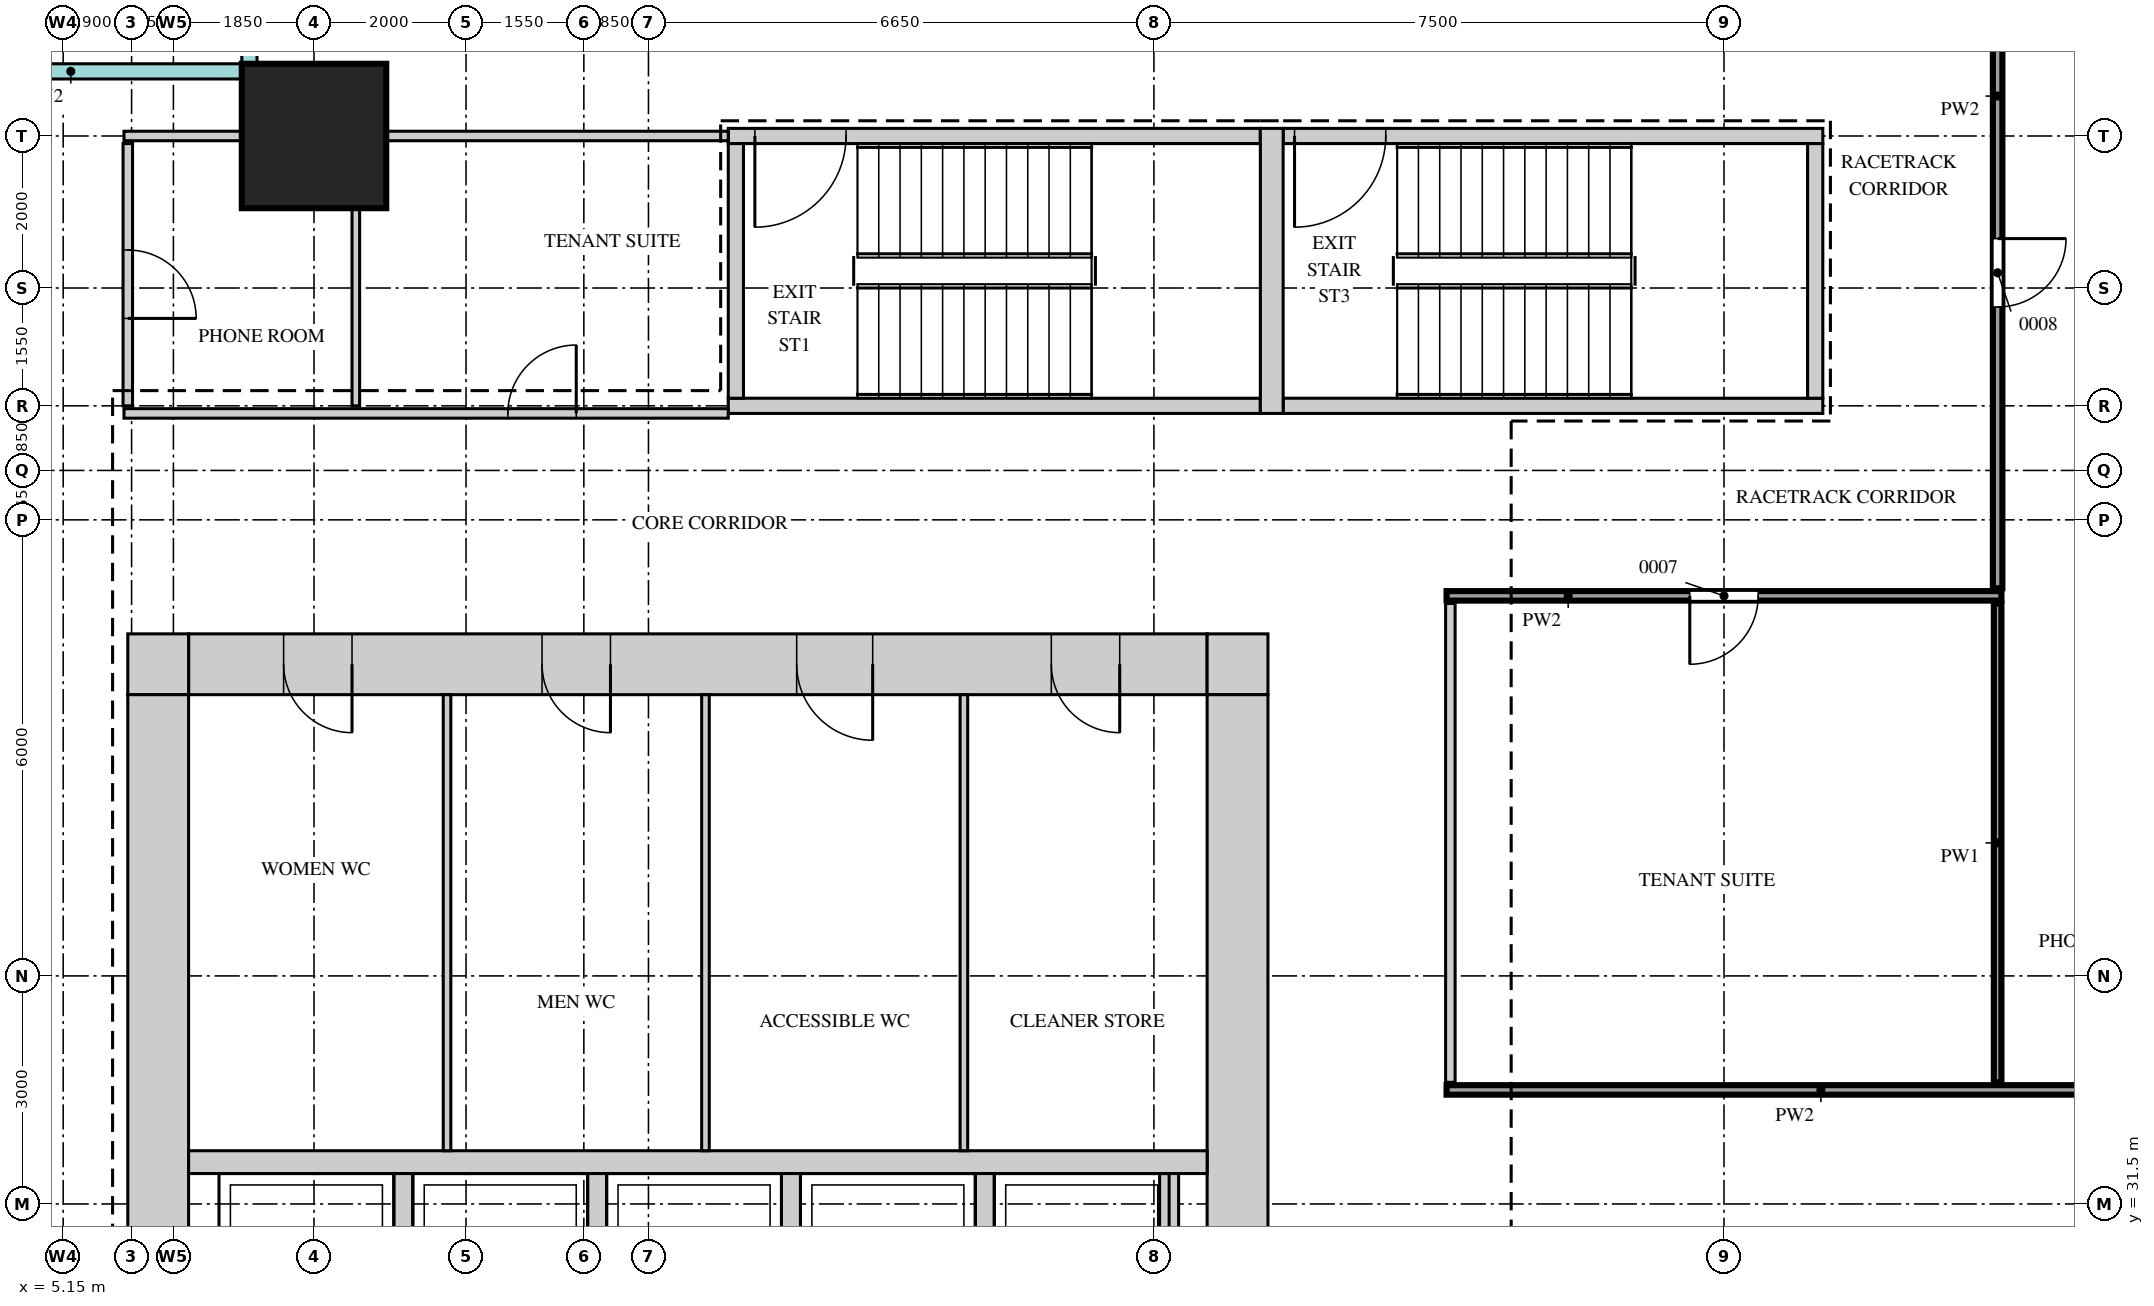
"""IFC4 building model, lengths in metres.
Left out: names, types, materials, properties, quantities, classifications, styles, units other than length and angle.
Written with IfcOpenShell. Run it as: python <this file> out.ifc"""

import sys

from ifc_helpers import new_model, si_unit, direction, frame, frame_2d, origin, origin_2d, place, context, subcontext, project, spatial, rectangle, extrude, source, transform, mapped, element, fill, save


model = new_model("IFC4")
c1 = context("Model", 3, precision=1e-05, world=origin(), true_north=direction((0.0, 1.0)))
c2 = subcontext(c1, "Body", "Model", "MODEL_VIEW")
j1 = project(units=[si_unit("LENGTHUNIT", "METRE"), si_unit("PLANEANGLEUNIT", "RADIAN")], contexts=[c1])
p1 = place(None, origin())
s1 = spatial("IfcSite", under=j1, at=p1, CompositionType="ELEMENT")
p2 = place(p1, origin())
s2 = spatial("IfcBuilding", under=s1, at=p2, CompositionType="ELEMENT")
p3 = place(p2, frame((0.0, 0.0, 180.7)))
s3 = spatial("IfcBuildingStorey", under=s2, at=p3, CompositionType="ELEMENT", Elevation=180.7)
m1 = source(origin(), c2, "Body", "SweptSolid", [
    extrude(rectangle(XDim=13.4, YDim=0.8, at=frame_2d((6.7, 0.0))), origin(), (0.0, 0.0, 1.0), 3.75),
])
p4 = place(p3, frame((6.8, 38.6, 0.0), z_axis=(0.0, 0.0, 1.0), x_axis=(1.0, 0.0, 0.0)))
e1 = element("IfcWall", 1, at=p4, inside=s3, PredefinedType="SHEAR", context=c2, shape_type="MappedRepresentation", body=[
    mapped(m1, transform((0.0, 0.0, 0.0))),
])
m2 = source(origin(), c2, "Body", "SweptSolid", [
    extrude(rectangle(XDim=0.9, YDim=2.1, at=frame_2d((0.45, 1.05))), frame((0.0, 0.41, 0.0), z_axis=(0.0, -1.0, 0.0), x_axis=(1.0, 0.0, 0.0)), (0.0, 0.0, 1.0), 0.82),
])
p5 = place(p4, frame((1.25, 0.0, 0.0)))
e2 = element("IfcOpeningElement", 2, at=p5, cuts=e1, PredefinedType="OPENING", context=c2, shape_type="MappedRepresentation", body=[
    mapped(m2, transform((0.0, 0.0, 0.0))),
])
p6 = place(p4, frame((4.65, 0.0, 0.0)))
e3 = element("IfcOpeningElement", 3, at=p6, cuts=e1, PredefinedType="OPENING", context=c2, shape_type="MappedRepresentation", body=[
    mapped(m2, transform((0.0, 0.0, 0.0))),
])
m3 = source(origin(), c2, "Body", "SweptSolid", [
    extrude(rectangle(XDim=1.0, YDim=2.1, at=frame_2d((0.5, 1.05))), frame((0.0, 0.41, 0.0), z_axis=(0.0, -1.0, 0.0), x_axis=(1.0, 0.0, 0.0)), (0.0, 0.0, 1.0), 0.82),
])
p7 = place(p4, frame((8.0, 0.0, 0.0)))
e4 = element("IfcOpeningElement", 4, at=p7, cuts=e1, PredefinedType="OPENING", context=c2, shape_type="MappedRepresentation", body=[
    mapped(m3, transform((0.0, 0.0, 0.0))),
])
p8 = place(p4, frame((11.35, 0.0, 0.0)))
e5 = element("IfcOpeningElement", 5, at=p8, cuts=e1, PredefinedType="OPENING", context=c2, shape_type="MappedRepresentation", body=[
    mapped(m2, transform((0.0, 0.0, 0.0))),
])
m4 = source(origin(), c2, "Body", "SweptSolid", [
    extrude(rectangle(XDim=0.8, YDim=0.8, at=frame_2d((0.4, 0.0))), origin(), (0.0, 0.0, 1.0), 3.75),
])
for number, where, z_axis, x_axis in (
    (6, (20.2, 38.6, 0.0), (0.0, 0.0, 1.0), (1.0, 0.0, 0.0)),
    (7, (6.0, 38.6, 0.0), (0.0, 0.0, 1.0), (1.0, 0.0, 0.0)),
):
    element("IfcWall", number, at=place(p3, frame(where, z_axis=z_axis, x_axis=x_axis)), inside=s3, PredefinedType="SHEAR", context=c2, shape_type="MappedRepresentation", body=[
        mapped(m4, transform((0.0, 0.0, 0.0))),
    ])
m5 = source(origin(), c2, "Body", "SweptSolid", [
    extrude(rectangle(XDim=22.4, YDim=0.8, at=frame_2d((11.2, 0.0))), origin(), (0.0, 0.0, 1.0), 3.75),
])
p9 = place(p3, frame((20.6, 15.8, 0.0), z_axis=(0.0, 0.0, 1.0), x_axis=(0.0, 1.0, 0.0)))
e8 = element("IfcWall", 8, at=p9, inside=s3, PredefinedType="SHEAR", context=c2, shape_type="MappedRepresentation", body=[
    mapped(m5, transform((0.0, 0.0, 0.0))),
])
m6 = source(origin(), c2, "Body", "SweptSolid", [
    extrude(rectangle(XDim=1.8, YDim=2.1, at=frame_2d((0.9, 1.05))), frame((0.0, 0.41, 0.0), z_axis=(0.0, -1.0, 0.0), x_axis=(1.0, 0.0, 0.0)), (0.0, 0.0, 1.0), 0.82),
])
p10 = place(p9, frame((10.7, 0.0, 0.0)))
e9 = element("IfcOpeningElement", 9, at=p10, cuts=e8, PredefinedType="OPENING", context=c2, shape_type="MappedRepresentation", body=[
    mapped(m6, transform((0.0, 0.0, 0.0))),
])
p11 = place(p9, frame((0.35, 0.0, 0.0)))
e10 = element("IfcOpeningElement", 10, at=p11, cuts=e8, PredefinedType="OPENING", context=c2, shape_type="MappedRepresentation", body=[
    mapped(m2, transform((0.0, 0.0, 0.0))),
])
p12 = place(p9, frame((3.9, 0.0, 0.0)))
e11 = element("IfcOpeningElement", 11, at=p12, cuts=e8, PredefinedType="OPENING", context=c2, shape_type="MappedRepresentation", body=[
    mapped(m2, transform((0.0, 0.0, 0.0))),
])
p13 = place(p3, frame((6.4, 15.8, 0.0), z_axis=(0.0, 0.0, 1.0), x_axis=(0.0, 1.0, 0.0)))
e12 = element("IfcWall", 12, at=p13, inside=s3, PredefinedType="SHEAR", context=c2, shape_type="MappedRepresentation", body=[
    mapped(m5, transform((0.0, 0.0, 0.0))),
])
m7 = source(origin(), c2, "Body", "SweptSolid", [
    extrude(rectangle(XDim=7.0, YDim=0.2, at=frame_2d((3.5, 0.0))), origin(), (0.0, 0.0, 1.0), 3.75),
])
p14 = place(p3, frame((13.9, 45.55, 0.0), z_axis=(0.0, 0.0, 1.0), x_axis=(1.0, 0.0, 0.0)))
e13 = element("IfcWall", 13, at=p14, inside=s3, PredefinedType="SHEAR", context=c2, shape_type="MappedRepresentation", body=[
    mapped(m7, transform((0.0, 0.0, 0.0))),
])
m8 = source(origin(), c2, "Body", "SweptSolid", [
    extrude(rectangle(XDim=1.2, YDim=2.1, at=frame_2d((0.6, 1.05))), frame((0.0, 0.11, 0.0), z_axis=(0.0, -1.0, 0.0), x_axis=(1.0, 0.0, 0.0)), (0.0, 0.0, 1.0), 0.22),
])
p15 = place(p14, frame((0.35, 0.0, 0.0)))
e14 = element("IfcOpeningElement", 14, at=p15, cuts=e13, PredefinedType="OPENING", context=c2, shape_type="MappedRepresentation", body=[
    mapped(m8, transform((0.0, 0.0, 0.0))),
])
p16 = place(p3, frame((13.9, 42.0, 0.0), z_axis=(0.0, 0.0, 1.0), x_axis=(1.0, 0.0, 0.0)))
e15 = element("IfcWall", 15, at=p16, inside=s3, PredefinedType="SHEAR", context=c2, shape_type="MappedRepresentation", body=[
    mapped(m7, transform((0.0, 0.0, 0.0))),
])
m9 = source(origin(), c2, "Body", "SweptSolid", [
    extrude(rectangle(XDim=7.1, YDim=0.2, at=frame_2d((3.55, 0.0))), origin(), (0.0, 0.0, 1.0), 3.75),
])
p17 = place(p3, frame((21.2, 45.55, 0.0), z_axis=(0.0, 0.0, 1.0), x_axis=(1.0, 0.0, 0.0)))
e16 = element("IfcWall", 16, at=p17, inside=s3, PredefinedType="SHEAR", context=c2, shape_type="MappedRepresentation", body=[
    mapped(m9, transform((0.0, 0.0, 0.0))),
])
p18 = place(p17, frame((0.15, 0.0, 0.0)))
e17 = element("IfcOpeningElement", 17, at=p18, cuts=e16, PredefinedType="OPENING", context=c2, shape_type="MappedRepresentation", body=[
    mapped(m8, transform((0.0, 0.0, 0.0))),
])
p19 = place(p3, frame((21.2, 42.0, 0.0), z_axis=(0.0, 0.0, 1.0), x_axis=(1.0, 0.0, 0.0)))
e18 = element("IfcWall", 18, at=p19, inside=s3, PredefinedType="SHEAR", context=c2, shape_type="MappedRepresentation", body=[
    mapped(m9, transform((0.0, 0.0, 0.0))),
])
m10 = source(origin(), c2, "Body", "SweptSolid", [
    extrude(rectangle(XDim=3.75, YDim=0.3, at=frame_2d((1.875, 0.0))), origin(), (0.0, 0.0, 1.0), 3.75),
])
p20 = place(p3, frame((21.05, 41.9, 0.0), z_axis=(0.0, 0.0, 1.0), x_axis=(0.0, 1.0, 0.0)))
e19 = element("IfcWall", 19, at=p20, inside=s3, PredefinedType="SHEAR", context=c2, shape_type="MappedRepresentation", body=[
    mapped(m10, transform((0.0, 0.0, 0.0))),
])
m11 = source(origin(), c2, "Body", "SweptSolid", [
    extrude(rectangle(XDim=3.35, YDim=0.2, at=frame_2d((1.675, 0.0))), origin(), (0.0, 0.0, 1.0), 3.75),
])
for number, where, z_axis, x_axis in (
    (20, (14.0, 42.1, 0.0), (0.0, 0.0, 1.0), (0.0, 1.0, 0.0)),
    (21, (28.2, 42.1, 0.0), (0.0, 0.0, 1.0), (0.0, 1.0, 0.0)),
):
    element("IfcWall", number, at=place(p3, frame(where, z_axis=z_axis, x_axis=x_axis)), inside=s3, PredefinedType="SHEAR", context=c2, shape_type="MappedRepresentation", body=[
        mapped(m11, transform((0.0, 0.0, 0.0))),
    ])
m12 = source(origin(), c2, "Body", "SweptSolid", [
    extrude(rectangle(XDim=13.4, YDim=0.3, at=frame_2d((6.7, 0.0))), origin(), (0.0, 0.0, 1.0), 3.75),
])
p21 = place(p3, frame((6.8, 32.05, 0.0), z_axis=(0.0, 0.0, 1.0), x_axis=(1.0, 0.0, 0.0)))
e22 = element("IfcWall", 22, at=p21, inside=s3, PredefinedType="STANDARD", context=c2, shape_type="MappedRepresentation", body=[
    mapped(m12, transform((0.0, 0.0, 0.0))),
])
m13 = source(origin(), c2, "Body", "SweptSolid", [
    extrude(rectangle(XDim=2.4, YDim=0.25, at=frame_2d((1.2, 0.0))), origin(), (0.0, 0.0, 1.0), 3.75),
])
for number, where, z_axis, x_axis in (
    (23, (17.275, 29.5, 0.0), (0.0, 0.0, 1.0), (0.0, 1.0, 0.0)),
    (24, (19.7, 29.5, 0.0), (0.0, 0.0, 1.0), (0.0, 1.0, 0.0)),
    (25, (9.625, 29.5, 0.0), (0.0, 0.0, 1.0), (0.0, 1.0, 0.0)),
    (26, (12.175, 29.5, 0.0), (0.0, 0.0, 1.0), (0.0, 1.0, 0.0)),
    (27, (14.725, 29.5, 0.0), (0.0, 0.0, 1.0), (0.0, 1.0, 0.0)),
):
    element("IfcWall", number, at=place(p3, frame(where, z_axis=z_axis, x_axis=x_axis)), inside=s3, PredefinedType="STANDARD", context=c2, shape_type="MappedRepresentation", body=[
        mapped(m13, transform((0.0, 0.0, 0.0))),
    ])
m14 = source(origin(), c2, "Body", "SweptSolid", [
    extrude(rectangle(XDim=1.9, YDim=1.9, at=origin_2d()), origin(), (0.0, 0.0, 1.0), 4.0),
])
p22 = place(p3, frame((8.45, 45.55, 0.0), z_axis=(0.0, 0.0, 1.0), x_axis=(1.0, 0.0, 0.0)))
e28 = element("IfcColumn", 28, at=p22, inside=s3, PredefinedType="COLUMN", context=c2, shape_type="MappedRepresentation", body=[
    mapped(m14, transform((0.0, 0.0, 0.0))),
])
m15 = source(origin(), c2, "Body", "SweptSolid", [
    extrude(rectangle(XDim=6.0, YDim=0.1, at=frame_2d((3.0, 0.0))), origin(), (0.0, 0.0, 1.0), 3.8),
])
for number, where, z_axis, x_axis in (
    (29, (10.2, 32.2, 0.0), (0.0, 0.0, 1.0), (0.0, 1.0, 0.0)),
    (30, (13.6, 32.2, 0.0), (0.0, 0.0, 1.0), (0.0, 1.0, 0.0)),
    (31, (17.0, 32.2, 0.0), (0.0, 0.0, 1.0), (0.0, 1.0, 0.0)),
):
    element("IfcWall", number, at=place(p3, frame(where, z_axis=z_axis, x_axis=x_axis)), inside=s3, PredefinedType="PARTITIONING", context=c2, shape_type="MappedRepresentation", body=[
        mapped(m15, transform((0.0, 0.0, 0.0))),
    ])
m16 = source(origin(), c2, "Body", "SweptSolid", [
    extrude(rectangle(XDim=9.85, YDim=0.125, at=frame_2d((4.925, 0.0))), origin(), (0.0, 0.0, 1.0), 3.8),
])
p23 = place(p3, frame((23.35, 33.0, 0.0), z_axis=(0.0, 0.0, 1.0), x_axis=(1.0, 0.0, 0.0)))
e32 = element("IfcWall", 32, at=p23, inside=s3, PredefinedType="PARTITIONING", context=c2, shape_type="MappedRepresentation", body=[
    mapped(m16, transform((0.0, 0.0, 0.0))),
])
m17 = source(origin(), c2, "Body", "SweptSolid", [
    extrude(rectangle(XDim=6.3, YDim=0.125, at=frame_2d((3.15, 0.0))), origin(), (0.0, 0.0, 1.0), 3.8),
])
p24 = place(p3, frame((23.4, 33.1, 0.0), z_axis=(0.0, 0.0, 1.0), x_axis=(0.0, 1.0, 0.0)))
e33 = element("IfcWall", 33, at=p24, inside=s3, PredefinedType="PARTITIONING", context=c2, shape_type="MappedRepresentation", body=[
    mapped(m17, transform((0.0, 0.0, 0.0))),
])
m18 = source(origin(), c2, "Body", "SweptSolid", [
    extrude(rectangle(XDim=6.3, YDim=0.1, at=frame_2d((3.15, 0.0))), origin(), (0.0, 0.0, 1.0), 3.8),
])
p25 = place(p3, frame((30.6, 33.1, 0.0), z_axis=(0.0, 0.0, 1.0), x_axis=(0.0, 1.0, 0.0)))
e34 = element("IfcWall", 34, at=p25, inside=s3, PredefinedType="PARTITIONING", context=c2, shape_type="MappedRepresentation", body=[
    mapped(m18, transform((0.0, 0.0, 0.0))),
])
m19 = source(origin(), c2, "Body", "SweptSolid", [
    extrude(rectangle(XDim=7.3, YDim=0.125, at=frame_2d((3.65, 0.0))), origin(), (0.0, 0.0, 1.0), 3.8),
])
p26 = place(p3, frame((23.35, 39.5, 0.0), z_axis=(0.0, 0.0, 1.0), x_axis=(1.0, 0.0, 0.0)))
e35 = element("IfcWall", 35, at=p26, inside=s3, PredefinedType="PARTITIONING", context=c2, shape_type="MappedRepresentation", body=[
    mapped(m19, transform((0.0, 0.0, 0.0))),
])
m20 = source(origin(), c2, "Body", "SweptSolid", [
    extrude(rectangle(XDim=0.9, YDim=2.1, at=frame_2d((0.45, 1.05))), frame((0.0, 0.073, 0.0), z_axis=(0.0, -1.0, 0.0), x_axis=(1.0, 0.0, 0.0)), (0.0, 0.0, 1.0), 0.145),
])
p27 = place(p26, frame((3.2, 0.0, 0.0)))
e36 = element("IfcOpeningElement", 36, at=p27, cuts=e35, PredefinedType="OPENING", context=c2, shape_type="MappedRepresentation", body=[
    mapped(m20, transform((0.0, 0.0, 0.0))),
])
m21 = source(origin(), c2, "Body", "SweptSolid", [
    extrude(rectangle(XDim=8.35, YDim=0.125, at=frame_2d((4.175, 0.0))), origin(), (0.0, 0.0, 1.0), 3.8),
])
p28 = place(p3, frame((30.6, 39.6, 0.0), z_axis=(0.0, 0.0, 1.0), x_axis=(0.0, 1.0, 0.0)))
e37 = element("IfcWall", 37, at=p28, inside=s3, PredefinedType="PARTITIONING", context=c2, shape_type="MappedRepresentation", body=[
    mapped(m21, transform((0.0, 0.0, 0.0))),
])
p29 = place(p28, frame((3.7, 0.0, 0.0)))
e38 = element("IfcOpeningElement", 38, at=p29, cuts=e37, PredefinedType="OPENING", context=c2, shape_type="MappedRepresentation", body=[
    mapped(m20, transform((0.0, 0.0, 0.0))),
])
m22 = source(origin(), c2, "Body", "SweptSolid", [
    extrude(rectangle(XDim=7.95, YDim=0.125, at=frame_2d((3.975, 0.0))), origin(), (0.0, 0.0, 1.0), 3.8),
])
p30 = place(p3, frame((5.95, 41.9, 0.0), z_axis=(0.0, 0.0, 1.0), x_axis=(1.0, 0.0, 0.0)))
e39 = element("IfcWall", 39, at=p30, inside=s3, PredefinedType="PARTITIONING", context=c2, shape_type="MappedRepresentation", body=[
    mapped(m22, transform((0.0, 0.0, 0.0))),
])
p31 = place(p30, frame((5.05, 0.0, 0.0)))
e40 = element("IfcOpeningElement", 40, at=p31, cuts=e39, PredefinedType="OPENING", context=c2, shape_type="MappedRepresentation", body=[
    mapped(m20, transform((0.0, 0.0, 0.0))),
])
m23 = source(origin(), c2, "Body", "SweptSolid", [
    extrude(rectangle(XDim=3.45, YDim=0.125, at=frame_2d((1.725, 0.0))), origin(), (0.0, 0.0, 1.0), 3.8),
])
p32 = place(p3, frame((6.0, 42.0, 0.0), z_axis=(0.0, 0.0, 1.0), x_axis=(0.0, 1.0, 0.0)))
e41 = element("IfcWall", 41, at=p32, inside=s3, PredefinedType="PARTITIONING", context=c2, shape_type="MappedRepresentation", body=[
    mapped(m23, transform((0.0, 0.0, 0.0))),
])
p33 = place(p32, frame((1.15, 0.0, 0.0)))
e42 = element("IfcOpeningElement", 42, at=p33, cuts=e41, PredefinedType="OPENING", context=c2, shape_type="MappedRepresentation", body=[
    mapped(m20, transform((0.0, 0.0, 0.0))),
])
m24 = source(origin(), c2, "Body", "SweptSolid", [
    extrude(rectangle(XDim=3.45, YDim=0.1, at=frame_2d((1.725, 0.0))), origin(), (0.0, 0.0, 1.0), 3.8),
])
p34 = place(p3, frame((9.0, 42.0, 0.0), z_axis=(0.0, 0.0, 1.0), x_axis=(0.0, 1.0, 0.0)))
e43 = element("IfcWall", 43, at=p34, inside=s3, PredefinedType="PARTITIONING", context=c2, shape_type="MappedRepresentation", body=[
    mapped(m24, transform((0.0, 0.0, 0.0))),
])
m25 = source(origin(), c2, "Body", "SweptSolid", [
    extrude(rectangle(XDim=7.95, YDim=0.125, at=frame_2d((3.975, 0.0))), origin(), (0.0, 0.0, 1.0), 3.25),
])
p35 = place(p3, frame((5.95, 45.55, 0.0), z_axis=(0.0, 0.0, 1.0), x_axis=(1.0, 0.0, 0.0)))
e44 = element("IfcWall", 44, at=p35, inside=s3, PredefinedType="PARTITIONING", context=c2, shape_type="MappedRepresentation", body=[
    mapped(m25, transform((0.0, 0.0, 0.0))),
])
m26 = source(origin(), c2, "Body", "SweptSolid", [
    extrude(rectangle(XDim=0.9, YDim=2.1, at=frame_2d((0.45, 1.05))), frame((0.0, 0.35, 0.0), z_axis=(0.0, -1.0, 0.0), x_axis=(1.0, 0.0, 0.0)), (0.0, 0.0, 1.0), 0.7),
])
p36 = place(p5, origin())
e45 = element("IfcDoor", 45, at=p36, inside=s3, OperationType="SINGLE_SWING_RIGHT", PredefinedType="DOOR", context=c2, shape_type="MappedRepresentation", body=[
    mapped(m26, transform((0.0, 0.0, 0.0))),
])
fill(e2, e45)
p37 = place(p6, origin())
e46 = element("IfcDoor", 46, at=p37, inside=s3, OperationType="SINGLE_SWING_RIGHT", PredefinedType="DOOR", context=c2, shape_type="MappedRepresentation", body=[
    mapped(m26, transform((0.0, 0.0, 0.0))),
])
fill(e3, e46)
m27 = source(origin(), c2, "Body", "SweptSolid", [
    extrude(rectangle(XDim=1.0, YDim=2.1, at=frame_2d((0.5, 1.05))), frame((0.0, 0.35, 0.0), z_axis=(0.0, -1.0, 0.0), x_axis=(1.0, 0.0, 0.0)), (0.0, 0.0, 1.0), 0.7),
])
p38 = place(p7, origin())
e47 = element("IfcDoor", 47, at=p38, inside=s3, OperationType="SINGLE_SWING_RIGHT", PredefinedType="DOOR", context=c2, shape_type="MappedRepresentation", body=[
    mapped(m27, transform((0.0, 0.0, 0.0))),
])
fill(e4, e47)
p39 = place(p8, origin())
e48 = element("IfcDoor", 48, at=p39, inside=s3, OperationType="SINGLE_SWING_RIGHT", PredefinedType="DOOR", context=c2, shape_type="MappedRepresentation", body=[
    mapped(m26, transform((0.0, 0.0, 0.0))),
])
fill(e5, e48)
m28 = source(origin(), c2, "Body", "SweptSolid", [
    extrude(rectangle(XDim=0.9, YDim=2.1, at=frame_2d((0.45, 1.05))), frame((0.0, 0.025, 0.0), z_axis=(0.0, -1.0, 0.0), x_axis=(1.0, 0.0, 0.0)), (0.0, 0.0, 1.0), 0.05),
])
p40 = place(p27, origin())
e49 = element("IfcDoor", 49, at=p40, inside=s3, OperationType="SINGLE_SWING_LEFT", PredefinedType="DOOR", context=c2, shape_type="MappedRepresentation", body=[
    mapped(m28, transform((0.0, 0.0, 0.0))),
])
fill(e36, e49)
p41 = place(p29, origin())
e50 = element("IfcDoor", 50, at=p41, inside=s3, OperationType="SINGLE_SWING_RIGHT", PredefinedType="DOOR", context=c2, shape_type="MappedRepresentation", body=[
    mapped(m28, transform((0.0, 0.0, 0.0))),
])
fill(e38, e50)
p42 = place(p33, origin())
e51 = element("IfcDoor", 51, at=p42, inside=s3, OperationType="SINGLE_SWING_LEFT", PredefinedType="DOOR", context=c2, shape_type="MappedRepresentation", body=[
    mapped(m28, transform((0.0, 0.0, 0.0))),
])
fill(e42, e51)
p43 = place(p31, origin())
e52 = element("IfcDoor", 52, at=p43, inside=s3, OperationType="SINGLE_SWING_LEFT", PredefinedType="DOOR", context=c2, shape_type="MappedRepresentation", body=[
    mapped(m28, transform((0.0, 0.0, 0.0))),
])
fill(e40, e52)
m29 = source(origin(), c2, "Body", "SweptSolid", [
    extrude(rectangle(XDim=1.2, YDim=2.1, at=frame_2d((0.6, 1.05))), frame((0.0, 0.025, 0.0), z_axis=(0.0, -1.0, 0.0), x_axis=(1.0, 0.0, 0.0)), (0.0, 0.0, 1.0), 0.05),
])
p44 = place(p15, origin())
e53 = element("IfcDoor", 53, at=p44, inside=s3, OperationType="SINGLE_SWING_LEFT", PredefinedType="DOOR", context=c2, shape_type="MappedRepresentation", body=[
    mapped(m29, transform((0.0, 0.0, 0.0))),
])
fill(e14, e53)
p45 = place(p18, origin())
e54 = element("IfcDoor", 54, at=p45, inside=s3, OperationType="SINGLE_SWING_LEFT", PredefinedType="DOOR", context=c2, shape_type="MappedRepresentation", body=[
    mapped(m29, transform((0.0, 0.0, 0.0))),
])
fill(e17, e54)
save(model, sys.argv[1])
